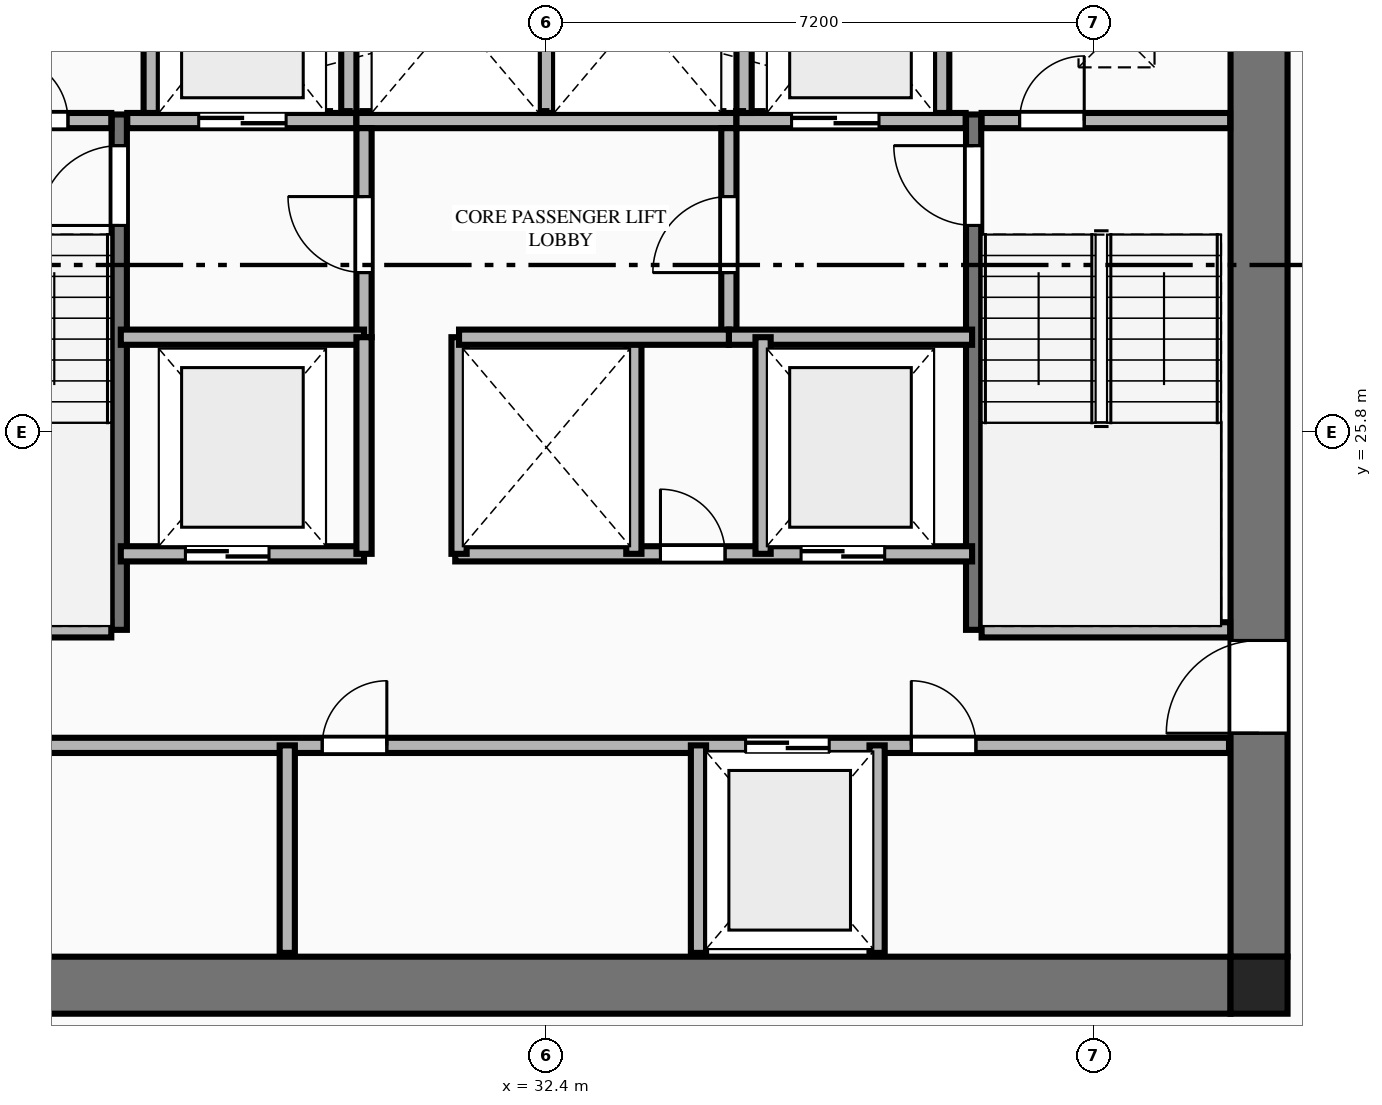
"""IFC4 building model, lengths in metres.
Left out: names, types, materials, properties, quantities, classifications, styles, units other than length and angle.
Written with IfcOpenShell. Run it as: python <this file> out.ifc"""

import sys

from ifc_helpers import new_model, si_unit, direction, frame, frame_2d, origin, origin_2d, place, context, subcontext, project, spatial, rectangle, extrude, element, fill, save


model = new_model("IFC4")
c1 = context("Model", 3, precision=1e-05, world=origin(), true_north=direction((0.0, 1.0)))
c2 = subcontext(c1, "Body", "Model", "MODEL_VIEW")
j1 = project(units=[si_unit("LENGTHUNIT", "METRE"), si_unit("PLANEANGLEUNIT", "RADIAN")], contexts=[c1])
p1 = place(None, origin())
s1 = spatial("IfcSite", under=j1, at=p1, CompositionType="ELEMENT")
p2 = place(p1, origin())
s2 = spatial("IfcBuilding", under=s1, at=p2, CompositionType="ELEMENT")
p3 = place(p2, frame((0.0, 0.0, 116.15)))
s3 = spatial("IfcBuildingStorey", under=s2, at=p3, CompositionType="ELEMENT", Elevation=116.15)
p4 = place(p3, frame((41.775, 18.525, 0.0), z_axis=(0.0, 0.0, 1.0), x_axis=(1.0, 0.0, 0.0)))
e1 = element("IfcColumn", 1, at=p4, inside=s3, PredefinedType="COLUMN", context=c2, shape_type="SweptSolid", body=[
    extrude(rectangle(XDim=0.75, YDim=0.75, at=origin_2d()), origin(), (0.0, 0.0, 1.0), 3.55),
])
p5 = place(p3, frame((23.4, 18.525, 0.0), z_axis=(0.0, 0.0, 1.0), x_axis=(1.0, 0.0, 0.0)))
e2 = element("IfcWall", 2, at=p5, inside=s3, PredefinedType="SHEAR", context=c2, shape_type="SweptSolid", body=[
    extrude(rectangle(XDim=18.0, YDim=0.75, at=frame_2d((9.0, 0.0))), origin(), (0.0, 0.0, 1.0), 3.34),
])
p6 = place(p3, frame((41.775, 18.9, 0.0), z_axis=(0.0, 0.0, 1.0), x_axis=(0.0, 1.0, 0.0)))
e3 = element("IfcWall", 3, at=p6, inside=s3, PredefinedType="SHEAR", context=c2, shape_type="SweptSolid", body=[
    extrude(rectangle(XDim=14.0, YDim=0.75, at=frame_2d((7.0, 0.0))), origin(), (0.0, 0.0, 1.0), 3.34),
])
p7 = place(p6, frame((2.94, 0.0, 0.0)))
e4 = element("IfcOpeningElement", 4, at=p7, cuts=e3, PredefinedType="OPENING", context=c2, shape_type="SweptSolid", body=[
    extrude(rectangle(XDim=1.22, YDim=2.25, at=frame_2d((0.61, 1.125))), frame((0.0, 0.385, 0.0), z_axis=(0.0, -1.0, 0.0), x_axis=(1.0, 0.0, 0.0)), (0.0, 0.0, 1.0), 0.77),
])
p8 = place(p3, frame((26.78, 23.2, 0.0), z_axis=(0.0, 0.0, 1.0), x_axis=(0.0, 1.0, 0.0)))
e5 = element("IfcWall", 5, at=p8, inside=s3, PredefinedType="SHEAR", context=c2, shape_type="SweptSolid", body=[
    extrude(rectangle(XDim=6.78, YDim=0.2, at=frame_2d((3.39, 0.0))), origin(), (0.0, 0.0, 1.0), 3.55),
])
p9 = place(p8, frame((5.32, 0.0, 0.0)))
e6 = element("IfcOpeningElement", 6, at=p9, cuts=e5, PredefinedType="OPENING", context=c2, shape_type="SweptSolid", body=[
    extrude(rectangle(XDim=1.05, YDim=2.15, at=frame_2d((0.525, 1.075))), frame((0.0, 0.11, 0.0), z_axis=(0.0, -1.0, 0.0), x_axis=(1.0, 0.0, 0.0)), (0.0, 0.0, 1.0), 0.22),
])
p10 = place(p3, frame((23.405, 23.2, 0.0), z_axis=(0.0, 0.0, 1.0), x_axis=(1.0, 0.0, 0.0)))
e7 = element("IfcWall", 7, at=p10, inside=s3, PredefinedType="PLUMBINGWALL", context=c2, shape_type="SweptSolid", body=[
    extrude(rectangle(XDim=3.27, YDim=0.2, at=frame_2d((1.635, 0.0))), origin(), (0.0, 0.0, 1.0), 3.34),
])
p11 = place(p3, frame((38.02, 23.2, 0.0), z_axis=(0.0, 0.0, 1.0), x_axis=(0.0, 1.0, 0.0)))
e8 = element("IfcWall", 8, at=p11, inside=s3, PredefinedType="SHEAR", context=c2, shape_type="SweptSolid", body=[
    extrude(rectangle(XDim=6.78, YDim=0.2, at=frame_2d((3.39, 0.0))), origin(), (0.0, 0.0, 1.0), 3.55),
])
p12 = place(p11, frame((5.32, 0.0, 0.0)))
e9 = element("IfcOpeningElement", 9, at=p12, cuts=e8, PredefinedType="OPENING", context=c2, shape_type="SweptSolid", body=[
    extrude(rectangle(XDim=1.05, YDim=2.15, at=frame_2d((0.525, 1.075))), frame((0.0, 0.11, 0.0), z_axis=(0.0, -1.0, 0.0), x_axis=(1.0, 0.0, 0.0)), (0.0, 0.0, 1.0), 0.22),
])
p13 = place(p3, frame((38.125, 23.2, 0.0), z_axis=(0.0, 0.0, 1.0), x_axis=(1.0, 0.0, 0.0)))
e10 = element("IfcWall", 10, at=p13, inside=s3, PredefinedType="PLUMBINGWALL", context=c2, shape_type="SweptSolid", body=[
    extrude(rectangle(XDim=3.27, YDim=0.2, at=frame_2d((1.635, 0.0))), origin(), (0.0, 0.0, 1.0), 3.34),
])
p14 = place(p3, frame((23.405, 29.9, 0.0), z_axis=(0.0, 0.0, 1.0), x_axis=(1.0, 0.0, 0.0)))
e11 = element("IfcWall", 11, at=p14, inside=s3, PredefinedType="PLUMBINGWALL", context=c2, shape_type="SweptSolid", body=[
    extrude(rectangle(XDim=3.27, YDim=0.2, at=frame_2d((1.635, 0.0))), origin(), (0.0, 0.0, 1.0), 3.34),
])
p15 = place(p14, frame((1.85, 0.0, 0.0)))
e12 = element("IfcOpeningElement", 12, at=p15, cuts=e11, PredefinedType="OPENING", context=c2, shape_type="SweptSolid", body=[
    extrude(rectangle(XDim=0.85, YDim=2.05, at=frame_2d((0.425, 1.025))), frame((0.0, 0.11, 0.0), z_axis=(0.0, -1.0, 0.0), x_axis=(1.0, 0.0, 0.0)), (0.0, 0.0, 1.0), 0.22),
])
p16 = place(p3, frame((26.885, 29.9, 0.0), z_axis=(0.0, 0.0, 1.0), x_axis=(1.0, 0.0, 0.0)))
e13 = element("IfcWall", 13, at=p16, inside=s3, PredefinedType="PLUMBINGWALL", context=c2, shape_type="SweptSolid", body=[
    extrude(rectangle(XDim=3.015, YDim=0.2, at=frame_2d((1.507, 0.0))), origin(), (0.0, 0.0, 1.0), 3.34),
])
p17 = place(p16, frame((0.94, 0.0, 0.0)))
e14 = element("IfcOpeningElement", 14, at=p17, cuts=e13, PredefinedType="OPENING", context=c2, shape_type="SweptSolid", body=[
    extrude(rectangle(XDim=1.15, YDim=2.2, at=frame_2d((0.575, 1.1))), frame((0.0, 0.11, 0.0), z_axis=(0.0, -1.0, 0.0), x_axis=(1.0, 0.0, 0.0)), (0.0, 0.0, 1.0), 0.22),
])
p18 = place(p3, frame((29.9, 29.9, 0.0), z_axis=(0.0, 0.0, 1.0), x_axis=(1.0, 0.0, 0.0)))
e15 = element("IfcWall", 15, at=p18, inside=s3, PredefinedType="PLUMBINGWALL", context=c2, shape_type="SweptSolid", body=[
    extrude(rectangle(XDim=5.0, YDim=0.2, at=frame_2d((2.5, 0.0))), origin(), (0.0, 0.0, 1.0), 3.34),
])
p19 = place(p3, frame((34.9, 29.9, 0.0), z_axis=(0.0, 0.0, 1.0), x_axis=(1.0, 0.0, 0.0)))
e16 = element("IfcWall", 16, at=p19, inside=s3, PredefinedType="PLUMBINGWALL", context=c2, shape_type="SweptSolid", body=[
    extrude(rectangle(XDim=3.015, YDim=0.2, at=frame_2d((1.508, 0.0))), origin(), (0.0, 0.0, 1.0), 3.34),
])
p20 = place(p19, frame((0.725, 0.0, 0.0)))
e17 = element("IfcOpeningElement", 17, at=p20, cuts=e16, PredefinedType="OPENING", context=c2, shape_type="SweptSolid", body=[
    extrude(rectangle(XDim=1.15, YDim=2.2, at=frame_2d((0.575, 1.1))), frame((0.0, 0.11, 0.0), z_axis=(0.0, -1.0, 0.0), x_axis=(1.0, 0.0, 0.0)), (0.0, 0.0, 1.0), 0.22),
])
p21 = place(p3, frame((38.125, 29.9, 0.0), z_axis=(0.0, 0.0, 1.0), x_axis=(1.0, 0.0, 0.0)))
e18 = element("IfcWall", 18, at=p21, inside=s3, PredefinedType="PLUMBINGWALL", context=c2, shape_type="SweptSolid", body=[
    extrude(rectangle(XDim=3.27, YDim=0.2, at=frame_2d((1.635, 0.0))), origin(), (0.0, 0.0, 1.0), 3.34),
])
p22 = place(p21, frame((0.5, 0.0, 0.0)))
e19 = element("IfcOpeningElement", 19, at=p22, cuts=e18, PredefinedType="OPENING", context=c2, shape_type="SweptSolid", body=[
    extrude(rectangle(XDim=0.85, YDim=2.05, at=frame_2d((0.425, 1.025))), frame((0.0, 0.11, 0.0), z_axis=(0.0, -1.0, 0.0), x_axis=(1.0, 0.0, 0.0)), (0.0, 0.0, 1.0), 0.22),
])
for number, where, z_axis, x_axis in (
    (20, (27.2, 30.0, 0.0), (0.0, 0.0, 1.0), (0.0, 1.0, 0.0)),
    (21, (29.8, 30.0, 0.0), (0.0, 0.0, 1.0), (0.0, 1.0, 0.0)),
    (22, (32.4, 30.0, 0.0), (0.0, 0.0, 1.0), (0.0, 1.0, 0.0)),
    (23, (35.0, 30.0, 0.0), (0.0, 0.0, 1.0), (0.0, 1.0, 0.0)),
    (24, (37.6, 30.0, 0.0), (0.0, 0.0, 1.0), (0.0, 1.0, 0.0)),
):
    element("IfcWall", number, at=place(p3, frame(where, z_axis=z_axis, x_axis=x_axis)), inside=s3, PredefinedType="PLUMBINGWALL", context=c2, shape_type="SweptSolid", body=[
        extrude(rectangle(XDim=2.85, YDim=0.2, at=frame_2d((1.425, 0.0))), origin(), (0.0, 0.0, 1.0), 3.34),
    ])
p23 = place(p3, frame((30.0, 27.05, 0.0), z_axis=(0.0, 0.0, 1.0), x_axis=(0.0, 1.0, 0.0)))
e25 = element("IfcWall", 25, at=p23, inside=s3, PredefinedType="PLUMBINGWALL", context=c2, shape_type="SweptSolid", body=[
    extrude(rectangle(XDim=2.75, YDim=0.2, at=frame_2d((1.375, 0.0))), origin(), (0.0, 0.0, 1.0), 3.34),
])
p24 = place(p23, frame((0.85, 0.0, 0.0)))
e26 = element("IfcOpeningElement", 26, at=p24, cuts=e25, PredefinedType="OPENING", context=c2, shape_type="SweptSolid", body=[
    extrude(rectangle(XDim=1.0, YDim=2.15, at=frame_2d((0.5, 1.075))), frame((0.0, 0.11, 0.0), z_axis=(0.0, -1.0, 0.0), x_axis=(1.0, 0.0, 0.0)), (0.0, 0.0, 1.0), 0.22),
])
p25 = place(p3, frame((26.8, 27.05, 0.0), z_axis=(0.0, 0.0, 1.0), x_axis=(1.0, 0.0, 0.0)))
e27 = element("IfcWall", 27, at=p25, inside=s3, PredefinedType="PLUMBINGWALL", context=c2, shape_type="SweptSolid", body=[
    extrude(rectangle(XDim=3.2, YDim=0.2, at=frame_2d((1.6, 0.0))), origin(), (0.0, 0.0, 1.0), 3.34),
])
p26 = place(p3, frame((34.8, 27.05, 0.0), z_axis=(0.0, 0.0, 1.0), x_axis=(0.0, 1.0, 0.0)))
e28 = element("IfcWall", 28, at=p26, inside=s3, PredefinedType="PLUMBINGWALL", context=c2, shape_type="SweptSolid", body=[
    extrude(rectangle(XDim=2.75, YDim=0.2, at=frame_2d((1.375, 0.0))), origin(), (0.0, 0.0, 1.0), 3.34),
])
p27 = place(p26, frame((0.85, 0.0, 0.0)))
e29 = element("IfcOpeningElement", 29, at=p27, cuts=e28, PredefinedType="OPENING", context=c2, shape_type="SweptSolid", body=[
    extrude(rectangle(XDim=1.0, YDim=2.15, at=frame_2d((0.5, 1.075))), frame((0.0, 0.11, 0.0), z_axis=(0.0, -1.0, 0.0), x_axis=(1.0, 0.0, 0.0)), (0.0, 0.0, 1.0), 0.22),
])
p28 = place(p3, frame((34.8, 27.05, 0.0), z_axis=(0.0, 0.0, 1.0), x_axis=(1.0, 0.0, 0.0)))
e30 = element("IfcWall", 30, at=p28, inside=s3, PredefinedType="PLUMBINGWALL", context=c2, shape_type="SweptSolid", body=[
    extrude(rectangle(XDim=3.2, YDim=0.2, at=frame_2d((1.6, 0.0))), origin(), (0.0, 0.0, 1.0), 3.34),
])
p29 = place(p3, frame((26.8, 24.2, 0.0), z_axis=(0.0, 0.0, 1.0), x_axis=(1.0, 0.0, 0.0)))
e31 = element("IfcWall", 31, at=p29, inside=s3, PredefinedType="PLUMBINGWALL", context=c2, shape_type="SweptSolid", body=[
    extrude(rectangle(XDim=3.2, YDim=0.2, at=frame_2d((1.6, 0.0))), origin(), (0.0, 0.0, 1.0), 3.34),
])
p30 = place(p29, frame((0.85, 0.0, 0.0)))
e32 = element("IfcOpeningElement", 32, at=p30, cuts=e31, PredefinedType="OPENING", context=c2, shape_type="SweptSolid", body=[
    extrude(rectangle(XDim=1.1, YDim=2.2, at=frame_2d((0.55, 1.1))), frame((0.0, 0.11, 0.0), z_axis=(0.0, -1.0, 0.0), x_axis=(1.0, 0.0, 0.0)), (0.0, 0.0, 1.0), 0.22),
])
p31 = place(p3, frame((30.0, 24.2, 0.0), z_axis=(0.0, 0.0, 1.0), x_axis=(0.0, 1.0, 0.0)))
e33 = element("IfcWall", 33, at=p31, inside=s3, PredefinedType="PLUMBINGWALL", context=c2, shape_type="SweptSolid", body=[
    extrude(rectangle(XDim=2.85, YDim=0.2, at=frame_2d((1.425, 0.0))), origin(), (0.0, 0.0, 1.0), 3.34),
])
p32 = place(p3, frame((31.2, 24.2, 0.0), z_axis=(0.0, 0.0, 1.0), x_axis=(1.0, 0.0, 0.0)))
e34 = element("IfcWall", 34, at=p32, inside=s3, PredefinedType="PLUMBINGWALL", context=c2, shape_type="SweptSolid", body=[
    extrude(rectangle(XDim=6.8, YDim=0.2, at=frame_2d((3.4, 0.0))), origin(), (0.0, 0.0, 1.0), 3.34),
])
p33 = place(p32, frame((2.7, 0.0, 0.0)))
e35 = element("IfcOpeningElement", 35, at=p33, cuts=e34, PredefinedType="OPENING", context=c2, shape_type="SweptSolid", body=[
    extrude(rectangle(XDim=0.85, YDim=2.05, at=frame_2d((0.425, 1.025))), frame((0.0, 0.11, 0.0), z_axis=(0.0, -1.0, 0.0), x_axis=(1.0, 0.0, 0.0)), (0.0, 0.0, 1.0), 0.22),
])
p34 = place(p32, frame((4.55, 0.0, 0.0)))
e36 = element("IfcOpeningElement", 36, at=p34, cuts=e34, PredefinedType="OPENING", context=c2, shape_type="SweptSolid", body=[
    extrude(rectangle(XDim=1.1, YDim=2.2, at=frame_2d((0.55, 1.1))), frame((0.0, 0.11, 0.0), z_axis=(0.0, -1.0, 0.0), x_axis=(1.0, 0.0, 0.0)), (0.0, 0.0, 1.0), 0.22),
])
for number, where, z_axis, x_axis in (
    (37, (31.25, 24.2, 0.0), (0.0, 0.0, 1.0), (0.0, 1.0, 0.0)),
    (38, (33.55, 24.2, 0.0), (0.0, 0.0, 1.0), (0.0, 1.0, 0.0)),
    (39, (35.25, 24.2, 0.0), (0.0, 0.0, 1.0), (0.0, 1.0, 0.0)),
):
    element("IfcWall", number, at=place(p3, frame(where, z_axis=z_axis, x_axis=x_axis)), inside=s3, PredefinedType="PLUMBINGWALL", context=c2, shape_type="SweptSolid", body=[
        extrude(rectangle(XDim=2.85, YDim=0.2, at=frame_2d((1.425, 0.0))), origin(), (0.0, 0.0, 1.0), 3.34),
    ])
p35 = place(p3, frame((31.25, 27.05, 0.0), z_axis=(0.0, 0.0, 1.0), x_axis=(1.0, 0.0, 0.0)))
e40 = element("IfcWall", 40, at=p35, inside=s3, PredefinedType="PLUMBINGWALL", context=c2, shape_type="SweptSolid", body=[
    extrude(rectangle(XDim=3.55, YDim=0.2, at=frame_2d((1.775, 0.0))), origin(), (0.0, 0.0, 1.0), 3.34),
])
p36 = place(p3, frame((23.42, 21.68, 0.0), z_axis=(0.0, 0.0, 1.0), x_axis=(1.0, 0.0, 0.0)))
e41 = element("IfcWall", 41, at=p36, inside=s3, PredefinedType="PLUMBINGWALL", context=c2, shape_type="SweptSolid", body=[
    extrude(rectangle(XDim=17.96, YDim=0.2, at=frame_2d((8.98, 0.0))), origin(), (0.0, 0.0, 1.0), 3.34),
])
p37 = place(p36, frame((11.6, 0.0, 0.0)))
e42 = element("IfcOpeningElement", 42, at=p37, cuts=e41, PredefinedType="OPENING", context=c2, shape_type="SweptSolid", body=[
    extrude(rectangle(XDim=1.1, YDim=2.2, at=frame_2d((0.55, 1.1))), frame((0.0, 0.11, 0.0), z_axis=(0.0, -1.0, 0.0), x_axis=(1.0, 0.0, 0.0)), (0.0, 0.0, 1.0), 0.22),
])
p38 = place(p36, frame((0.41, 0.0, 0.0)))
e43 = element("IfcOpeningElement", 43, at=p38, cuts=e41, PredefinedType="OPENING", context=c2, shape_type="SweptSolid", body=[
    extrude(rectangle(XDim=0.85, YDim=2.05, at=frame_2d((0.425, 1.025))), frame((0.0, 0.11, 0.0), z_axis=(0.0, -1.0, 0.0), x_axis=(1.0, 0.0, 0.0)), (0.0, 0.0, 1.0), 0.22),
])
p39 = place(p36, frame((6.03, 0.0, 0.0)))
e44 = element("IfcOpeningElement", 44, at=p39, cuts=e41, PredefinedType="OPENING", context=c2, shape_type="SweptSolid", body=[
    extrude(rectangle(XDim=0.85, YDim=2.05, at=frame_2d((0.425, 1.025))), frame((0.0, 0.11, 0.0), z_axis=(0.0, -1.0, 0.0), x_axis=(1.0, 0.0, 0.0)), (0.0, 0.0, 1.0), 0.22),
])
p40 = place(p36, frame((13.78, 0.0, 0.0)))
e45 = element("IfcOpeningElement", 45, at=p40, cuts=e41, PredefinedType="OPENING", context=c2, shape_type="SweptSolid", body=[
    extrude(rectangle(XDim=0.85, YDim=2.05, at=frame_2d((0.425, 1.025))), frame((0.0, 0.11, 0.0), z_axis=(0.0, -1.0, 0.0), x_axis=(1.0, 0.0, 0.0)), (0.0, 0.0, 1.0), 0.22),
])
for number, where, z_axis, x_axis in (
    (46, (34.4, 18.95, 0.0), (0.0, 0.0, 1.0), (0.0, 1.0, 0.0)),
    (47, (36.75, 18.95, 0.0), (0.0, 0.0, 1.0), (0.0, 1.0, 0.0)),
    (48, (28.99, 18.95, 0.0), (0.0, 0.0, 1.0), (0.0, 1.0, 0.0)),
):
    element("IfcWall", number, at=place(p3, frame(where, z_axis=z_axis, x_axis=x_axis)), inside=s3, PredefinedType="PLUMBINGWALL", context=c2, shape_type="SweptSolid", body=[
        extrude(rectangle(XDim=2.73, YDim=0.2, at=frame_2d((1.365, 0.0))), origin(), (0.0, 0.0, 1.0), 3.34),
    ])
p41 = place(p7, origin())
e49 = element("IfcDoor", 49, at=p41, inside=s3, OperationType="SINGLE_SWING_LEFT", PredefinedType="DOOR", context=c2, shape_type="SweptSolid", body=[
    extrude(rectangle(XDim=1.22, YDim=2.25, at=frame_2d((0.61, 1.125))), frame((0.0, 0.025, 0.0), z_axis=(0.0, -1.0, 0.0), x_axis=(1.0, 0.0, 0.0)), (0.0, 0.0, 1.0), 0.05),
])
fill(e4, e49)
p42 = place(p9, origin())
e50 = element("IfcDoor", 50, at=p42, inside=s3, OperationType="SINGLE_SWING_LEFT", PredefinedType="DOOR", context=c2, shape_type="SweptSolid", body=[
    extrude(rectangle(XDim=1.05, YDim=2.15, at=frame_2d((0.525, 1.075))), frame((0.0, 0.025, 0.0), z_axis=(0.0, -1.0, 0.0), x_axis=(1.0, 0.0, 0.0)), (0.0, 0.0, 1.0), 0.05),
])
fill(e6, e50)
p43 = place(p12, origin())
e51 = element("IfcDoor", 51, at=p43, inside=s3, OperationType="SINGLE_SWING_RIGHT", PredefinedType="DOOR", context=c2, shape_type="SweptSolid", body=[
    extrude(rectangle(XDim=1.05, YDim=2.15, at=frame_2d((0.525, 1.075))), frame((0.0, 0.025, 0.0), z_axis=(0.0, -1.0, 0.0), x_axis=(1.0, 0.0, 0.0)), (0.0, 0.0, 1.0), 0.05),
])
fill(e9, e51)
p44 = place(p15, origin())
e52 = element("IfcDoor", 52, at=p44, inside=s3, OperationType="SINGLE_SWING_LEFT", PredefinedType="DOOR", context=c2, shape_type="SweptSolid", body=[
    extrude(rectangle(XDim=0.85, YDim=2.05, at=frame_2d((0.425, 1.025))), frame((0.0, 0.025, 0.0), z_axis=(0.0, -1.0, 0.0), x_axis=(1.0, 0.0, 0.0)), (0.0, 0.0, 1.0), 0.05),
])
fill(e12, e52)
p45 = place(p22, origin())
e53 = element("IfcDoor", 53, at=p45, inside=s3, OperationType="SINGLE_SWING_RIGHT", PredefinedType="DOOR", context=c2, shape_type="SweptSolid", body=[
    extrude(rectangle(XDim=0.85, YDim=2.05, at=frame_2d((0.425, 1.025))), frame((0.0, 0.025, 0.0), z_axis=(0.0, -1.0, 0.0), x_axis=(1.0, 0.0, 0.0)), (0.0, 0.0, 1.0), 0.05),
])
fill(e19, e53)
p46 = place(p17, origin())
e54 = element("IfcDoor", 54, at=p46, inside=s3, OperationType="DOUBLE_DOOR_SLIDING", PredefinedType="DOOR", context=c2, shape_type="SweptSolid", body=[
    extrude(rectangle(XDim=1.15, YDim=2.2, at=frame_2d((0.575, 1.1))), frame((0.0, 0.025, 0.0), z_axis=(0.0, -1.0, 0.0), x_axis=(1.0, 0.0, 0.0)), (0.0, 0.0, 1.0), 0.05),
])
fill(e14, e54)
p47 = place(p20, origin())
e55 = element("IfcDoor", 55, at=p47, inside=s3, OperationType="DOUBLE_DOOR_SLIDING", PredefinedType="DOOR", context=c2, shape_type="SweptSolid", body=[
    extrude(rectangle(XDim=1.15, YDim=2.2, at=frame_2d((0.575, 1.1))), frame((0.0, 0.025, 0.0), z_axis=(0.0, -1.0, 0.0), x_axis=(1.0, 0.0, 0.0)), (0.0, 0.0, 1.0), 0.05),
])
fill(e17, e55)
p48 = place(p24, origin())
e56 = element("IfcDoor", 56, at=p48, inside=s3, OperationType="SINGLE_SWING_RIGHT", PredefinedType="DOOR", context=c2, shape_type="SweptSolid", body=[
    extrude(rectangle(XDim=1.0, YDim=2.15, at=frame_2d((0.5, 1.075))), frame((0.0, 0.025, 0.0), z_axis=(0.0, -1.0, 0.0), x_axis=(1.0, 0.0, 0.0)), (0.0, 0.0, 1.0), 0.05),
])
fill(e26, e56)
p49 = place(p27, origin())
e57 = element("IfcDoor", 57, at=p49, inside=s3, OperationType="SINGLE_SWING_LEFT", PredefinedType="DOOR", context=c2, shape_type="SweptSolid", body=[
    extrude(rectangle(XDim=1.0, YDim=2.15, at=frame_2d((0.5, 1.075))), frame((0.0, 0.025, 0.0), z_axis=(0.0, -1.0, 0.0), x_axis=(1.0, 0.0, 0.0)), (0.0, 0.0, 1.0), 0.05),
])
fill(e29, e57)
p50 = place(p30, origin())
e58 = element("IfcDoor", 58, at=p50, inside=s3, OperationType="DOUBLE_DOOR_SLIDING", PredefinedType="DOOR", context=c2, shape_type="SweptSolid", body=[
    extrude(rectangle(XDim=1.1, YDim=2.2, at=frame_2d((0.55, 1.1))), frame((0.0, 0.025, 0.0), z_axis=(0.0, -1.0, 0.0), x_axis=(1.0, 0.0, 0.0)), (0.0, 0.0, 1.0), 0.05),
])
fill(e32, e58)
p51 = place(p33, origin())
e59 = element("IfcDoor", 59, at=p51, inside=s3, OperationType="SINGLE_SWING_LEFT", PredefinedType="DOOR", context=c2, shape_type="SweptSolid", body=[
    extrude(rectangle(XDim=0.85, YDim=2.05, at=frame_2d((0.425, 1.025))), frame((0.0, 0.025, 0.0), z_axis=(0.0, -1.0, 0.0), x_axis=(1.0, 0.0, 0.0)), (0.0, 0.0, 1.0), 0.05),
])
fill(e35, e59)
p52 = place(p34, origin())
e60 = element("IfcDoor", 60, at=p52, inside=s3, OperationType="DOUBLE_DOOR_SLIDING", PredefinedType="DOOR", context=c2, shape_type="SweptSolid", body=[
    extrude(rectangle(XDim=1.1, YDim=2.2, at=frame_2d((0.55, 1.1))), frame((0.0, 0.025, 0.0), z_axis=(0.0, -1.0, 0.0), x_axis=(1.0, 0.0, 0.0)), (0.0, 0.0, 1.0), 0.05),
])
fill(e36, e60)
p53 = place(p37, origin())
e61 = element("IfcDoor", 61, at=p53, inside=s3, OperationType="DOUBLE_DOOR_SLIDING", PredefinedType="DOOR", context=c2, shape_type="SweptSolid", body=[
    extrude(rectangle(XDim=1.1, YDim=2.2, at=frame_2d((0.55, 1.1))), frame((0.0, 0.025, 0.0), z_axis=(0.0, -1.0, 0.0), x_axis=(1.0, 0.0, 0.0)), (0.0, 0.0, 1.0), 0.05),
])
fill(e42, e61)
p54 = place(p39, origin())
e62 = element("IfcDoor", 62, at=p54, inside=s3, OperationType="SINGLE_SWING_RIGHT", PredefinedType="DOOR", context=c2, shape_type="SweptSolid", body=[
    extrude(rectangle(XDim=0.85, YDim=2.05, at=frame_2d((0.425, 1.025))), frame((0.0, 0.025, 0.0), z_axis=(0.0, -1.0, 0.0), x_axis=(1.0, 0.0, 0.0)), (0.0, 0.0, 1.0), 0.05),
])
fill(e44, e62)
p55 = place(p40, origin())
e63 = element("IfcDoor", 63, at=p55, inside=s3, OperationType="SINGLE_SWING_LEFT", PredefinedType="DOOR", context=c2, shape_type="SweptSolid", body=[
    extrude(rectangle(XDim=0.85, YDim=2.05, at=frame_2d((0.425, 1.025))), frame((0.0, 0.025, 0.0), z_axis=(0.0, -1.0, 0.0), x_axis=(1.0, 0.0, 0.0)), (0.0, 0.0, 1.0), 0.05),
])
fill(e45, e63)
save(model, sys.argv[1])
